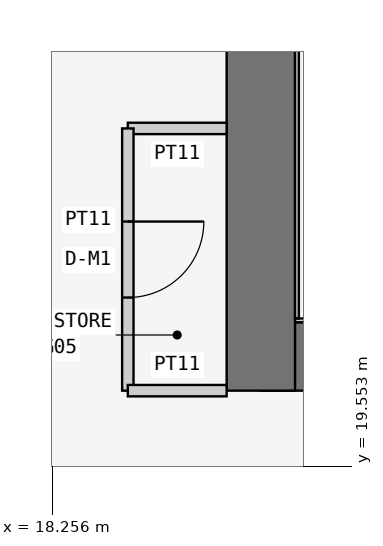
"""IFC4 building model, lengths in metres.
Left out: names, types, materials, properties, quantities, classifications, styles, units other than length and angle.
Written with IfcOpenShell. Run it as: python <this file> out.ifc"""

import sys

from ifc_helpers import new_model, si_unit, direction, frame, frame_2d, origin, place, context, subcontext, project, spatial, rectangle, extrude, element, fill, save


model = new_model("IFC4")
c1 = context("Model", 3, precision=1e-05, world=origin(), true_north=direction((0.0, 1.0)))
c2 = subcontext(c1, "Body", "Model", "MODEL_VIEW")
j1 = project(units=[si_unit("LENGTHUNIT", "METRE"), si_unit("PLANEANGLEUNIT", "RADIAN")], contexts=[c1])
p1 = place(None, origin())
s1 = spatial("IfcSite", under=j1, at=p1, CompositionType="ELEMENT")
p2 = place(p1, origin())
s2 = spatial("IfcBuilding", under=s1, at=p2, CompositionType="ELEMENT")
p3 = place(p2, frame((0.0, 0.0, 173.7)))
s3 = spatial("IfcBuildingStorey", under=s2, at=p3, CompositionType="ELEMENT", Elevation=173.7)
p4 = place(p3, frame((21.0, 21.0, 0.0), z_axis=(0.0, 0.0, 1.0), x_axis=(1.0, 0.0, 0.0)))
e1 = element("IfcWall", 1, at=p4, inside=s3, PredefinedType="SHEAR", context=c2, shape_type="SweptSolid", body=[
    extrude(rectangle(XDim=17.25, YDim=0.9, at=frame_2d((8.625, 0.0))), origin(), (0.0, 0.0, 1.0), 3.6),
])
p5 = place(p3, frame((21.0, 37.8, 0.0), z_axis=(0.0, 0.0, 1.0), x_axis=(0.0, -1.0, 0.0)))
e2 = element("IfcWall", 2, at=p5, inside=s3, PredefinedType="SHEAR", context=c2, shape_type="SweptSolid", body=[
    extrude(rectangle(XDim=17.25, YDim=0.9, at=frame_2d((8.625, 0.0))), origin(), (0.0, 0.0, 1.0), 3.6),
])
p6 = place(p5, frame((5.4, 0.0, 0.0)))
e3 = element("IfcOpeningElement", 3, at=p6, cuts=e2, PredefinedType="OPENING", context=c2, shape_type="SweptSolid", body=[
    extrude(rectangle(XDim=1.2, YDim=2.1, at=frame_2d((0.6, 1.05))), frame((0.0, 0.46, 0.0), z_axis=(0.0, -1.0, 0.0), x_axis=(1.0, 0.0, 0.0)), (0.0, 0.0, 1.0), 0.92),
])
p7 = place(p3, frame((20.55, 24.0, 0.0), z_axis=(0.0, 0.0, 1.0), x_axis=(-1.0, 0.0, 0.0)))
e4 = element("IfcWall", 4, at=p7, inside=s3, PredefinedType="PARTITIONING", context=c2, shape_type="SweptSolid", body=[
    extrude(rectangle(XDim=1.3, YDim=0.15, at=frame_2d((0.65, 0.0))), origin(), (0.0, 0.0, 1.0), 3.35),
])
p8 = place(p3, frame((19.25, 24.0, 0.0), z_axis=(0.0, 0.0, 1.0), x_axis=(0.0, -1.0, 0.0)))
e5 = element("IfcWall", 5, at=p8, inside=s3, PredefinedType="PARTITIONING", context=c2, shape_type="SweptSolid", body=[
    extrude(rectangle(XDim=3.45, YDim=0.15, at=frame_2d((1.725, 0.0))), origin(), (0.0, 0.0, 1.0), 3.35),
])
p9 = place(p8, frame((1.225, 0.0, 0.0)))
e6 = element("IfcOpeningElement", 6, at=p9, cuts=e5, PredefinedType="OPENING", context=c2, shape_type="SweptSolid", body=[
    extrude(rectangle(XDim=1.0, YDim=2.1, at=frame_2d((0.5, 1.05))), frame((0.0, 0.085, 0.0), z_axis=(0.0, -1.0, 0.0), x_axis=(1.0, 0.0, 0.0)), (0.0, 0.0, 1.0), 0.17),
])
p10 = place(p3, frame((19.25, 20.55, 0.0), z_axis=(0.0, 0.0, 1.0), x_axis=(1.0, 0.0, 0.0)))
e7 = element("IfcWall", 7, at=p10, inside=s3, PredefinedType="PARTITIONING", context=c2, shape_type="SweptSolid", body=[
    extrude(rectangle(XDim=1.3, YDim=0.15, at=frame_2d((0.65, 0.0))), origin(), (0.0, 0.0, 1.0), 3.35),
])
p11 = place(p3, frame((21.45, 21.475, 1.8), z_axis=(0.0, 0.0, 1.0), x_axis=(1.0, 0.0, 0.0)))
e8 = element("IfcWall", 8, at=p11, inside=s3, PredefinedType="PARTITIONING", context=c2, shape_type="SweptSolid", body=[
    extrude(rectangle(XDim=4.95, YDim=0.05, at=frame_2d((2.475, 0.0))), origin(), (0.0, 0.0, 1.0), 1.8),
])
p12 = place(p3, frame((21.475, 25.28, 1.8), z_axis=(0.0, 0.0, 1.0), x_axis=(0.0, -1.0, 0.0)))
e9 = element("IfcWall", 9, at=p12, inside=s3, PredefinedType="PARTITIONING", context=c2, shape_type="SweptSolid", body=[
    extrude(rectangle(XDim=3.78, YDim=0.05, at=frame_2d((1.89, 0.0))), origin(), (0.0, 0.0, 1.0), 1.8),
])
p13 = place(p9, origin())
e10 = element("IfcDoor", 10, at=p13, inside=s3, OperationType="SINGLE_SWING_LEFT", PredefinedType="DOOR", context=c2, shape_type="SweptSolid", body=[
    extrude(rectangle(XDim=1.0, YDim=2.1, at=frame_2d((0.5, 1.05))), frame((0.0, 0.025, 0.0), z_axis=(0.0, -1.0, 0.0), x_axis=(1.0, 0.0, 0.0)), (0.0, 0.0, 1.0), 0.05),
])
fill(e6, e10)
save(model, sys.argv[1])
